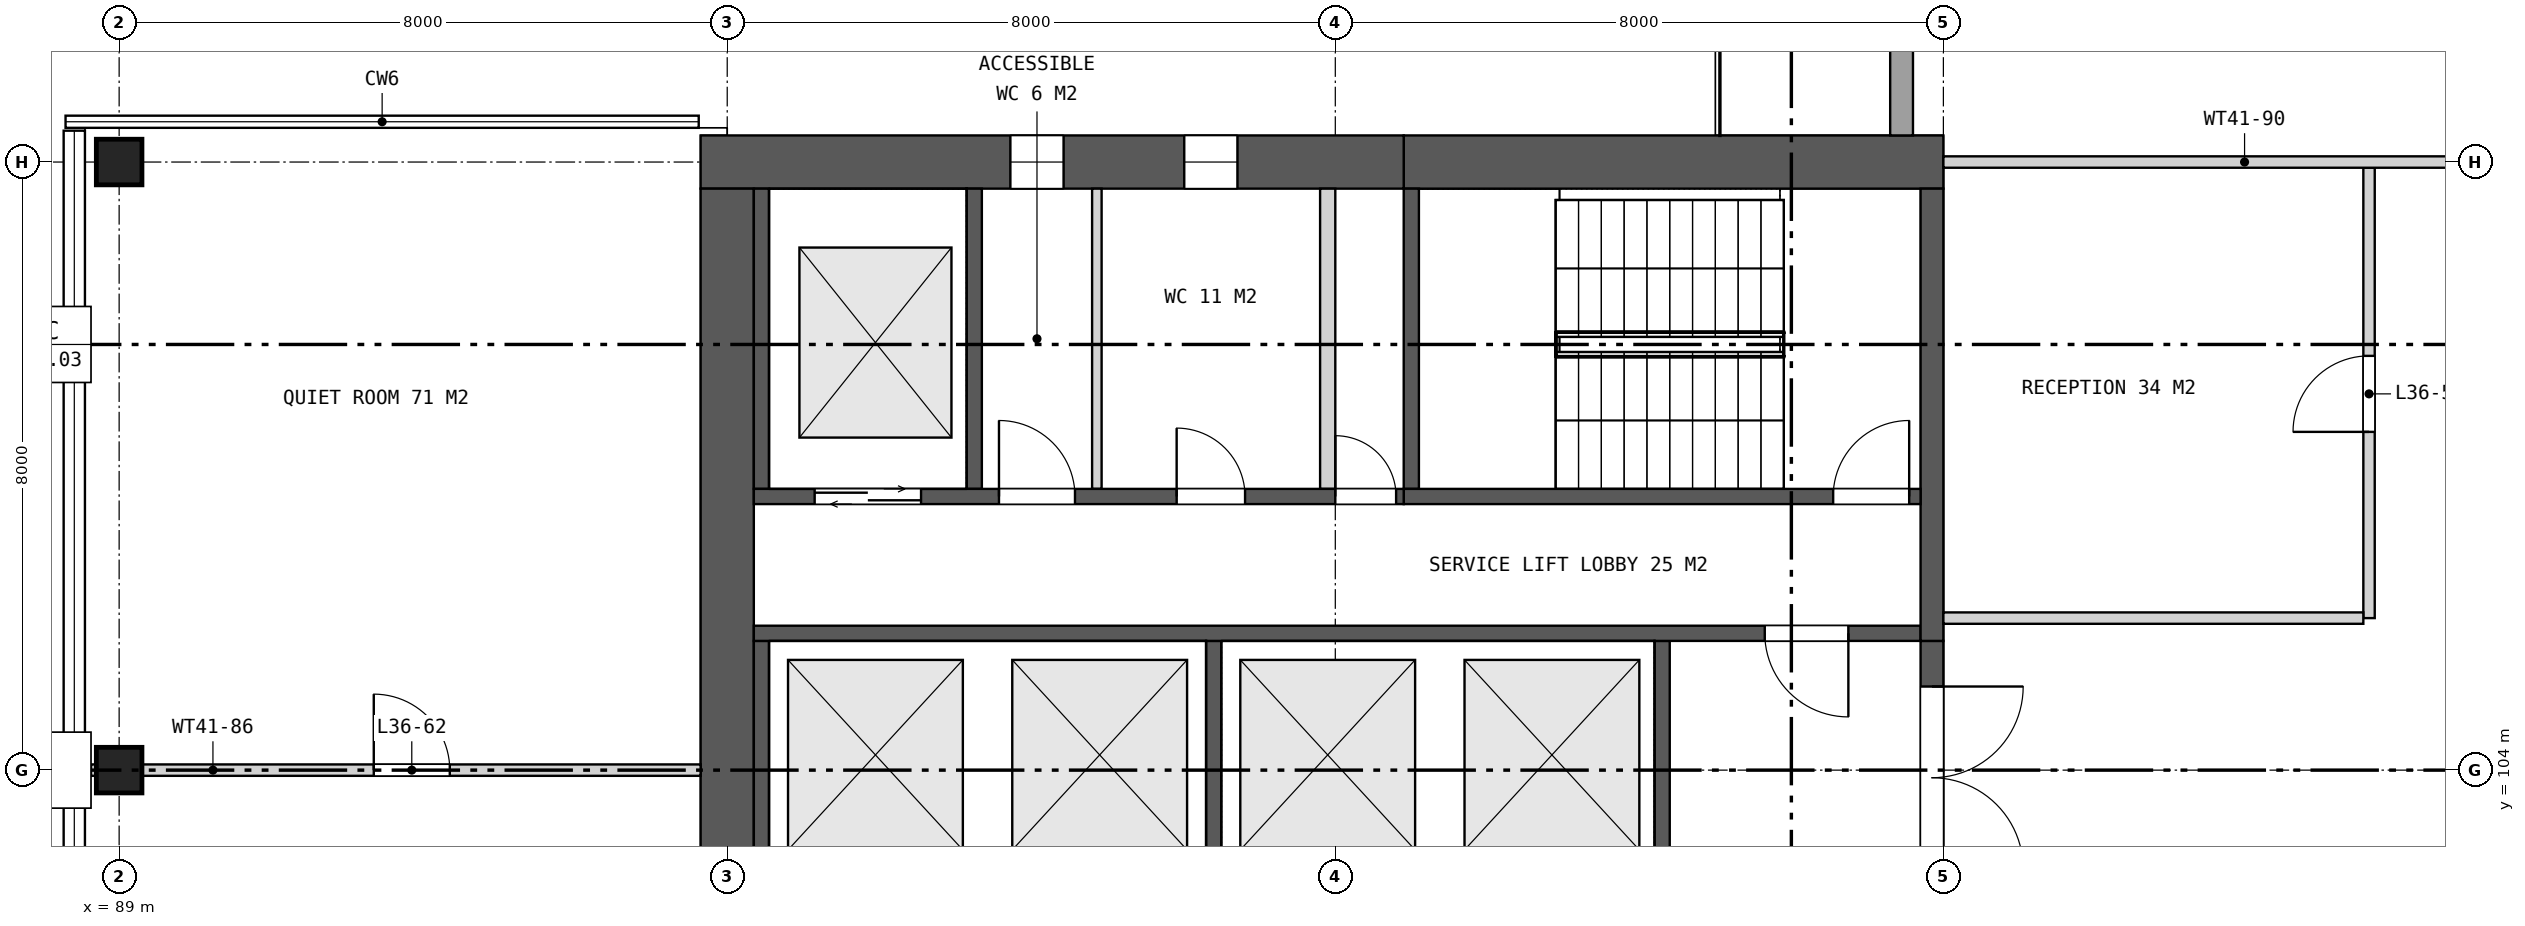
"""IFC4 building model, lengths in metres.
Left out: names, types, materials, properties, quantities, classifications, styles, units other than length and angle.
Written with IfcOpenShell. Run it as: python <this file> out.ifc"""

import sys

from ifc_helpers import new_model, si_unit, direction, frame, frame_2d, origin, origin_2d, place, context, subcontext, project, spatial, rectangle, extrude, element, fill, save


model = new_model("IFC4")
c1 = context("Model", 3, precision=1e-05, world=origin(), true_north=direction((0.0, 1.0)))
c2 = subcontext(c1, "Body", "Model", "MODEL_VIEW")
j1 = project(units=[si_unit("LENGTHUNIT", "METRE"), si_unit("PLANEANGLEUNIT", "RADIAN")], contexts=[c1])
p1 = place(None, origin())
s1 = spatial("IfcSite", under=j1, at=p1, CompositionType="ELEMENT")
p2 = place(p1, origin())
s2 = spatial("IfcBuilding", under=s1, at=p2, CompositionType="ELEMENT")
p3 = place(p2, frame((0.0, 0.0, 171.5)))
s3 = spatial("IfcBuildingStorey", under=s2, at=p3, CompositionType="ELEMENT", Elevation=171.5)
for number, where, z_axis, x_axis in (
    (1, (89.0, 104.0, 0.0), (0.0, 0.0, 1.0), (1.0, 0.0, 0.0)),
    (2, (89.0, 112.0, 0.0), (0.0, 0.0, 1.0), (1.0, 0.0, 0.0)),
):
    element("IfcColumn", number, at=place(p3, frame(where, z_axis=z_axis, x_axis=x_axis)), inside=s3, PredefinedType="COLUMN", context=c2, shape_type="SweptSolid", body=[
        extrude(rectangle(XDim=0.6, YDim=0.6, at=origin_2d()), origin(), (0.0, 0.0, 1.0), 7.4),
    ])
p4 = place(p3, frame((113.0, 112.0, 0.0), z_axis=(0.0, 0.0, 1.0), x_axis=(-1.0, 0.0, 0.0)))
e3 = element("IfcWall", 3, at=p4, inside=s3, PredefinedType="SHEAR", context=c2, shape_type="SweptSolid", body=[
    extrude(rectangle(XDim=7.1, YDim=0.7, at=frame_2d((3.55, 0.0))), origin(), (0.0, 0.0, 1.0), 7.4),
])
p5 = place(p3, frame((105.9, 112.0, 0.0), z_axis=(0.0, 0.0, 1.0), x_axis=(-1.0, 0.0, 0.0)))
e4 = element("IfcWall", 4, at=p5, inside=s3, PredefinedType="SHEAR", context=c2, shape_type="SweptSolid", body=[
    extrude(rectangle(XDim=9.25, YDim=0.7, at=frame_2d((4.625, 0.0))), origin(), (0.0, 0.0, 1.0), 7.4),
])
p6 = place(p5, frame((2.187, 0.0, 1.5)))
e5 = element("IfcOpeningElement", 5, at=p6, cuts=e4, PredefinedType="OPENING", context=c2, shape_type="SweptSolid", body=[
    extrude(rectangle(XDim=0.7, YDim=0.9, at=frame_2d((0.35, 0.45))), frame((0.0, 0.36, 0.0), z_axis=(0.0, -1.0, 0.0), x_axis=(1.0, 0.0, 0.0)), (0.0, 0.0, 1.0), 0.72),
])
p7 = place(p5, frame((4.475, 0.0, 1.5)))
e6 = element("IfcOpeningElement", 6, at=p7, cuts=e4, PredefinedType="OPENING", context=c2, shape_type="SweptSolid", body=[
    extrude(rectangle(XDim=0.7, YDim=0.9, at=frame_2d((0.35, 0.45))), frame((0.0, 0.36, 0.0), z_axis=(0.0, -1.0, 0.0), x_axis=(1.0, 0.0, 0.0)), (0.0, 0.0, 1.0), 0.72),
])
p8 = place(p3, frame((97.0, 111.65, 0.0), z_axis=(0.0, 0.0, 1.0), x_axis=(0.0, -1.0, 0.0)))
e7 = element("IfcWall", 7, at=p8, inside=s3, PredefinedType="SHEAR", context=c2, shape_type="SweptSolid", body=[
    extrude(rectangle(XDim=23.3, YDim=0.7, at=frame_2d((11.65, 0.0))), origin(), (0.0, 0.0, 1.0), 7.4),
])
p9 = place(p8, frame((10.45, 0.0, 0.0)))
e8 = element("IfcOpeningElement", 8, at=p9, cuts=e7, PredefinedType="OPENING", context=c2, shape_type="SweptSolid", body=[
    extrude(rectangle(XDim=2.4, YDim=2.4, at=frame_2d((1.2, 1.2))), frame((0.0, 0.36, 0.0), z_axis=(0.0, -1.0, 0.0), x_axis=(1.0, 0.0, 0.0)), (0.0, 0.0, 1.0), 0.72),
])
p10 = place(p3, frame((112.85, 105.7, 0.0), z_axis=(0.0, 0.0, 1.0), x_axis=(0.0, -1.0, 0.0)))
e9 = element("IfcWall", 9, at=p10, inside=s3, PredefinedType="SHEAR", context=c2, shape_type="SweptSolid", body=[
    extrude(rectangle(XDim=11.4, YDim=0.3, at=frame_2d((5.7, 0.0))), origin(), (0.0, 0.0, 1.0), 7.4),
])
p11 = place(p10, frame((0.6, 0.0, 0.0)))
e10 = element("IfcOpeningElement", 10, at=p11, cuts=e9, PredefinedType="OPENING", context=c2, shape_type="SweptSolid", body=[
    extrude(rectangle(XDim=2.4, YDim=2.4, at=frame_2d((1.2, 1.2))), frame((0.0, 0.16, 0.0), z_axis=(0.0, -1.0, 0.0), x_axis=(1.0, 0.0, 0.0)), (0.0, 0.0, 1.0), 0.32),
])
p12 = place(p10, frame((4.5, 0.0, 0.0)))
e11 = element("IfcOpeningElement", 11, at=p12, cuts=e9, PredefinedType="OPENING", context=c2, shape_type="SweptSolid", body=[
    extrude(rectangle(XDim=2.4, YDim=2.4, at=frame_2d((1.2, 1.2))), frame((0.0, 0.16, 0.0), z_axis=(0.0, -1.0, 0.0), x_axis=(1.0, 0.0, 0.0)), (0.0, 0.0, 1.0), 0.32),
])
p13 = place(p10, frame((8.4, 0.0, 0.0)))
e12 = element("IfcOpeningElement", 12, at=p13, cuts=e9, PredefinedType="OPENING", context=c2, shape_type="SweptSolid", body=[
    extrude(rectangle(XDim=2.4, YDim=2.4, at=frame_2d((1.2, 1.2))), frame((0.0, 0.16, 0.0), z_axis=(0.0, -1.0, 0.0), x_axis=(1.0, 0.0, 0.0)), (0.0, 0.0, 1.0), 0.32),
])
for number, where, z_axis, x_axis in (
    (13, (109.3, 105.7, 0.0), (0.0, 0.0, 1.0), (0.0, -1.0, 0.0)),
    (14, (103.4, 105.7, 0.0), (0.0, 0.0, 1.0), (0.0, -1.0, 0.0)),
    (15, (97.45, 105.7, 0.0), (0.0, 0.0, 1.0), (0.0, -1.0, 0.0)),
):
    element("IfcWall", number, at=place(p3, frame(where, z_axis=z_axis, x_axis=x_axis)), inside=s3, PredefinedType="SHEAR", context=c2, shape_type="SweptSolid", body=[
        extrude(rectangle(XDim=3.0, YDim=0.2, at=frame_2d((1.5, 0.0))), origin(), (0.0, 0.0, 1.0), 7.4),
    ])
p14 = place(p3, frame((112.7, 105.8, 0.0), z_axis=(0.0, 0.0, 1.0), x_axis=(-1.0, 0.0, 0.0)))
e16 = element("IfcWall", 16, at=p14, inside=s3, PredefinedType="SHEAR", context=c2, shape_type="SweptSolid", body=[
    extrude(rectangle(XDim=15.35, YDim=0.2, at=frame_2d((7.675, 0.0))), origin(), (0.0, 0.0, 1.0), 7.4),
])
p15 = place(p14, frame((0.95, 0.0, 0.0)))
e17 = element("IfcOpeningElement", 17, at=p15, cuts=e16, PredefinedType="OPENING", context=c2, shape_type="SweptSolid", body=[
    extrude(rectangle(XDim=1.1, YDim=2.1, at=frame_2d((0.55, 1.05))), frame((0.0, 0.11, 0.0), z_axis=(0.0, -1.0, 0.0), x_axis=(1.0, 0.0, 0.0)), (0.0, 0.0, 1.0), 0.22),
])
p16 = place(p3, frame((112.85, 111.65, 0.0), z_axis=(0.0, 0.0, 1.0), x_axis=(0.0, -1.0, 0.0)))
e18 = element("IfcWall", 18, at=p16, inside=s3, PredefinedType="SHEAR", context=c2, shape_type="SweptSolid", body=[
    extrude(rectangle(XDim=5.95, YDim=0.3, at=frame_2d((2.975, 0.0))), origin(), (0.0, 0.0, 1.0), 7.4),
])
for number, where, z_axis, x_axis in (
    (19, (106.0, 111.65, 0.0), (0.0, 0.0, 1.0), (0.0, -1.0, 0.0)),
    (20, (100.25, 111.65, 0.0), (0.0, 0.0, 1.0), (0.0, -1.0, 0.0)),
    (21, (97.45, 111.65, 0.0), (0.0, 0.0, 1.0), (0.0, -1.0, 0.0)),
):
    element("IfcWall", number, at=place(p3, frame(where, z_axis=z_axis, x_axis=x_axis)), inside=s3, PredefinedType="SHEAR", context=c2, shape_type="SweptSolid", body=[
        extrude(rectangle(XDim=3.95, YDim=0.2, at=frame_2d((1.975, 0.0))), origin(), (0.0, 0.0, 1.0), 7.4),
    ])
p17 = place(p3, frame((104.9, 111.65, 0.0), z_axis=(0.0, 0.0, 1.0), x_axis=(0.0, -1.0, 0.0)))
e22 = element("IfcWall", 22, at=p17, inside=s3, PredefinedType="PARTITIONING", context=c2, shape_type="SweptSolid", body=[
    extrude(rectangle(XDim=3.95, YDim=0.2, at=frame_2d((1.975, 0.0))), origin(), (0.0, 0.0, 1.0), 7.4),
])
p18 = place(p3, frame((101.863, 111.65, 0.0), z_axis=(0.0, 0.0, 1.0), x_axis=(0.0, -1.0, 0.0)))
e23 = element("IfcWall", 23, at=p18, inside=s3, PredefinedType="PARTITIONING", context=c2, shape_type="SweptSolid", body=[
    extrude(rectangle(XDim=3.95, YDim=0.125, at=frame_2d((1.975, 0.0))), origin(), (0.0, 0.0, 1.0), 7.4),
])
p19 = place(p3, frame((112.7, 107.6, 0.0), z_axis=(0.0, 0.0, 1.0), x_axis=(-1.0, 0.0, 0.0)))
e24 = element("IfcWall", 24, at=p19, inside=s3, PredefinedType="SHEAR", context=c2, shape_type="SweptSolid", body=[
    extrude(rectangle(XDim=6.8, YDim=0.2, at=frame_2d((3.4, 0.0))), origin(), (0.0, 0.0, 1.0), 7.4),
])
p20 = place(p19, frame((0.15, 0.0, 0.0)))
e25 = element("IfcOpeningElement", 25, at=p20, cuts=e24, PredefinedType="OPENING", context=c2, shape_type="SweptSolid", body=[
    extrude(rectangle(XDim=1.0, YDim=2.1, at=frame_2d((0.5, 1.05))), frame((0.0, 0.11, 0.0), z_axis=(0.0, -1.0, 0.0), x_axis=(1.0, 0.0, 0.0)), (0.0, 0.0, 1.0), 0.22),
])
p21 = place(p3, frame((105.9, 107.6, 0.0), z_axis=(0.0, 0.0, 1.0), x_axis=(-1.0, 0.0, 0.0)))
e26 = element("IfcWall", 26, at=p21, inside=s3, PredefinedType="SHEAR", context=c2, shape_type="SweptSolid", body=[
    extrude(rectangle(XDim=8.55, YDim=0.2, at=frame_2d((4.275, 0.0))), origin(), (0.0, 0.0, 1.0), 7.4),
])
p22 = place(p21, frame((0.1, 0.0, 0.0)))
e27 = element("IfcOpeningElement", 27, at=p22, cuts=e26, PredefinedType="OPENING", context=c2, shape_type="SweptSolid", body=[
    extrude(rectangle(XDim=0.8, YDim=2.1, at=frame_2d((0.4, 1.05))), frame((0.0, 0.11, 0.0), z_axis=(0.0, -1.0, 0.0), x_axis=(1.0, 0.0, 0.0)), (0.0, 0.0, 1.0), 0.22),
])
p23 = place(p21, frame((2.087, 0.0, 0.0)))
e28 = element("IfcOpeningElement", 28, at=p23, cuts=e26, PredefinedType="OPENING", context=c2, shape_type="SweptSolid", body=[
    extrude(rectangle(XDim=0.9, YDim=2.1, at=frame_2d((0.45, 1.05))), frame((0.0, 0.11, 0.0), z_axis=(0.0, -1.0, 0.0), x_axis=(1.0, 0.0, 0.0)), (0.0, 0.0, 1.0), 0.22),
])
p24 = place(p21, frame((4.325, 0.0, 0.0)))
e29 = element("IfcOpeningElement", 29, at=p24, cuts=e26, PredefinedType="OPENING", context=c2, shape_type="SweptSolid", body=[
    extrude(rectangle(XDim=1.0, YDim=2.1, at=frame_2d((0.5, 1.05))), frame((0.0, 0.11, 0.0), z_axis=(0.0, -1.0, 0.0), x_axis=(1.0, 0.0, 0.0)), (0.0, 0.0, 1.0), 0.22),
])
p25 = place(p21, frame((6.35, 0.0, 0.0)))
e30 = element("IfcOpeningElement", 30, at=p25, cuts=e26, PredefinedType="OPENING", context=c2, shape_type="SweptSolid", body=[
    extrude(rectangle(XDim=1.4, YDim=2.1, at=frame_2d((0.7, 1.05))), frame((0.0, 0.11, 0.0), z_axis=(0.0, -1.0, 0.0), x_axis=(1.0, 0.0, 0.0)), (0.0, 0.0, 1.0), 0.22),
])
p26 = place(p3, frame((112.45, 119.962, 0.0), z_axis=(0.0, 0.0, 1.0), x_axis=(0.0, -1.0, 0.0)))
e31 = element("IfcWall", 31, at=p26, inside=s3, PredefinedType="SOLIDWALL", context=c2, shape_type="SweptSolid", body=[
    extrude(rectangle(XDim=7.612, YDim=0.3, at=frame_2d((3.806, 0.0))), origin(), (0.0, 0.0, 1.0), 7.1),
])
p27 = place(p26, frame((2.762, 0.0, 0.0)))
e32 = element("IfcOpeningElement", 32, at=p27, cuts=e31, PredefinedType="OPENING", context=c2, shape_type="SweptSolid", body=[
    extrude(rectangle(XDim=2.4, YDim=2.4, at=frame_2d((1.2, 1.2))), frame((0.0, 0.16, 0.0), z_axis=(0.0, -1.0, 0.0), x_axis=(1.0, 0.0, 0.0)), (0.0, 0.0, 1.0), 0.32),
])
p28 = place(p3, frame((118.6, 106.0, 0.0), z_axis=(0.0, 0.0, 1.0), x_axis=(0.0, 1.0, 0.0)))
e33 = element("IfcWall", 33, at=p28, inside=s3, PredefinedType="PARTITIONING", context=c2, shape_type="SweptSolid", body=[
    extrude(rectangle(XDim=5.925, YDim=0.15, at=frame_2d((2.962, 0.0))), origin(), (0.0, 0.0, 1.0), 6.64),
])
p29 = place(p28, frame((2.45, 0.0, 0.0)))
e34 = element("IfcOpeningElement", 34, at=p29, cuts=e33, PredefinedType="OPENING", context=c2, shape_type="SweptSolid", body=[
    extrude(rectangle(XDim=1.0, YDim=2.1, at=frame_2d((0.5, 1.05))), frame((0.0, 0.085, 0.0), z_axis=(0.0, -1.0, 0.0), x_axis=(1.0, 0.0, 0.0)), (0.0, 0.0, 1.0), 0.17),
])
p30 = place(p3, frame((88.63, 104.0, 0.0), z_axis=(0.0, 0.0, 1.0), x_axis=(1.0, 0.0, 0.0)))
e35 = element("IfcWall", 35, at=p30, inside=s3, PredefinedType="PARTITIONING", context=c2, shape_type="SweptSolid", body=[
    extrude(rectangle(XDim=8.02, YDim=0.15, at=frame_2d((4.01, 0.0))), origin(), (0.0, 0.0, 1.0), 6.64),
])
p31 = place(p30, frame((3.72, 0.0, 0.0)))
e36 = element("IfcOpeningElement", 36, at=p31, cuts=e35, PredefinedType="OPENING", context=c2, shape_type="SweptSolid", body=[
    extrude(rectangle(XDim=1.0, YDim=2.1, at=frame_2d((0.5, 1.05))), frame((0.0, 0.085, 0.0), z_axis=(0.0, -1.0, 0.0), x_axis=(1.0, 0.0, 0.0)), (0.0, 0.0, 1.0), 0.17),
])
p32 = place(p3, frame((113.0, 106.0, 0.0), z_axis=(0.0, 0.0, 1.0), x_axis=(1.0, 0.0, 0.0)))
e37 = element("IfcWall", 37, at=p32, inside=s3, PredefinedType="PARTITIONING", context=c2, shape_type="SweptSolid", body=[
    extrude(rectangle(XDim=5.525, YDim=0.15, at=frame_2d((2.762, 0.0))), origin(), (0.0, 0.0, 1.0), 6.64),
])
p33 = place(p3, frame((113.0, 112.0, 0.0), z_axis=(0.0, 0.0, 1.0), x_axis=(1.0, 0.0, 0.0)))
e38 = element("IfcWall", 38, at=p33, inside=s3, PredefinedType="PARTITIONING", context=c2, shape_type="SweptSolid", body=[
    extrude(rectangle(XDim=7.925, YDim=0.15, at=frame_2d((3.962, 0.0))), origin(), (0.0, 0.0, 1.0), 6.64),
])
p34 = place(p6, origin())
e39 = element("IfcWindow", 39, at=p34, inside=s3, PartitioningType="SINGLE_PANEL", PredefinedType="WINDOW", context=c2, shape_type="SweptSolid", body=[
    extrude(rectangle(XDim=0.7, YDim=0.9, at=frame_2d((0.35, 0.45))), frame((0.0, 0.03, 0.0), z_axis=(0.0, -1.0, 0.0), x_axis=(1.0, 0.0, 0.0)), (0.0, 0.0, 1.0), 0.06),
])
fill(e5, e39)
p35 = place(p7, origin())
e40 = element("IfcWindow", 40, at=p35, inside=s3, PartitioningType="SINGLE_PANEL", PredefinedType="WINDOW", context=c2, shape_type="SweptSolid", body=[
    extrude(rectangle(XDim=0.7, YDim=0.9, at=frame_2d((0.35, 0.45))), frame((0.0, 0.03, 0.0), z_axis=(0.0, -1.0, 0.0), x_axis=(1.0, 0.0, 0.0)), (0.0, 0.0, 1.0), 0.06),
])
fill(e6, e40)
p36 = place(p11, origin())
e41 = element("IfcDoor", 41, at=p36, inside=s3, OperationType="DOUBLE_DOOR_SINGLE_SWING", PredefinedType="DOOR", context=c2, shape_type="SweptSolid", body=[
    extrude(rectangle(XDim=2.4, YDim=2.4, at=frame_2d((1.2, 1.2))), frame((0.0, 0.025, 0.0), z_axis=(0.0, -1.0, 0.0), x_axis=(1.0, 0.0, 0.0)), (0.0, 0.0, 1.0), 0.05),
])
fill(e10, e41)
p37 = place(p15, origin())
e42 = element("IfcDoor", 42, at=p37, inside=s3, OperationType="SINGLE_SWING_LEFT", PredefinedType="DOOR", context=c2, shape_type="SweptSolid", body=[
    extrude(rectangle(XDim=1.1, YDim=2.1, at=frame_2d((0.55, 1.05))), frame((0.0, 0.025, 0.0), z_axis=(0.0, -1.0, 0.0), x_axis=(1.0, 0.0, 0.0)), (0.0, 0.0, 1.0), 0.05),
])
fill(e17, e42)
p38 = place(p20, frame((1.0, 0.0, 0.0), z_axis=(0.0, 0.0, 1.0), x_axis=(-1.0, 0.0, 0.0)))
e43 = element("IfcDoor", 43, at=p38, inside=s3, OperationType="SINGLE_SWING_RIGHT", PredefinedType="DOOR", context=c2, shape_type="SweptSolid", body=[
    extrude(rectangle(XDim=1.0, YDim=2.1, at=frame_2d((0.5, 1.05))), frame((0.0, 0.025, 0.0), z_axis=(0.0, -1.0, 0.0), x_axis=(1.0, 0.0, 0.0)), (0.0, 0.0, 1.0), 0.05),
])
fill(e25, e43)
p39 = place(p22, frame((0.8, 0.0, 0.0), z_axis=(0.0, 0.0, 1.0), x_axis=(-1.0, 0.0, 0.0)))
e44 = element("IfcDoor", 44, at=p39, inside=s3, OperationType="SINGLE_SWING_LEFT", PredefinedType="DOOR", context=c2, shape_type="SweptSolid", body=[
    extrude(rectangle(XDim=0.8, YDim=2.1, at=frame_2d((0.4, 1.05))), frame((0.0, 0.025, 0.0), z_axis=(0.0, -1.0, 0.0), x_axis=(1.0, 0.0, 0.0)), (0.0, 0.0, 1.0), 0.05),
])
fill(e27, e44)
p40 = place(p23, frame((0.9, 0.0, 0.0), z_axis=(0.0, 0.0, 1.0), x_axis=(-1.0, 0.0, 0.0)))
e45 = element("IfcDoor", 45, at=p40, inside=s3, OperationType="SINGLE_SWING_LEFT", PredefinedType="DOOR", context=c2, shape_type="SweptSolid", body=[
    extrude(rectangle(XDim=0.9, YDim=2.1, at=frame_2d((0.45, 1.05))), frame((0.0, 0.025, 0.0), z_axis=(0.0, -1.0, 0.0), x_axis=(1.0, 0.0, 0.0)), (0.0, 0.0, 1.0), 0.05),
])
fill(e28, e45)
p41 = place(p24, frame((1.0, 0.0, 0.0), z_axis=(0.0, 0.0, 1.0), x_axis=(-1.0, 0.0, 0.0)))
e46 = element("IfcDoor", 46, at=p41, inside=s3, OperationType="SINGLE_SWING_LEFT", PredefinedType="DOOR", context=c2, shape_type="SweptSolid", body=[
    extrude(rectangle(XDim=1.0, YDim=2.1, at=frame_2d((0.5, 1.05))), frame((0.0, 0.025, 0.0), z_axis=(0.0, -1.0, 0.0), x_axis=(1.0, 0.0, 0.0)), (0.0, 0.0, 1.0), 0.05),
])
fill(e29, e46)
p42 = place(p25, origin())
e47 = element("IfcDoor", 47, at=p42, inside=s3, OperationType="DOUBLE_DOOR_SLIDING", PredefinedType="DOOR", context=c2, shape_type="SweptSolid", body=[
    extrude(rectangle(XDim=1.4, YDim=2.1, at=frame_2d((0.7, 1.05))), frame((0.0, 0.025, 0.0), z_axis=(0.0, -1.0, 0.0), x_axis=(1.0, 0.0, 0.0)), (0.0, 0.0, 1.0), 0.05),
])
fill(e30, e47)
p43 = place(p29, origin())
e48 = element("IfcDoor", 48, at=p43, inside=s3, OperationType="SINGLE_SWING_LEFT", PredefinedType="DOOR", context=c2, shape_type="SweptSolid", body=[
    extrude(rectangle(XDim=1.0, YDim=2.1, at=frame_2d((0.5, 1.05))), frame((0.0, 0.025, 0.0), z_axis=(0.0, -1.0, 0.0), x_axis=(1.0, 0.0, 0.0)), (0.0, 0.0, 1.0), 0.05),
])
fill(e34, e48)
p44 = place(p31, origin())
e49 = element("IfcDoor", 49, at=p44, inside=s3, OperationType="SINGLE_SWING_LEFT", PredefinedType="DOOR", context=c2, shape_type="SweptSolid", body=[
    extrude(rectangle(XDim=1.0, YDim=2.1, at=frame_2d((0.5, 1.05))), frame((0.0, 0.025, 0.0), z_axis=(0.0, -1.0, 0.0), x_axis=(1.0, 0.0, 0.0)), (0.0, 0.0, 1.0), 0.05),
])
fill(e36, e49)
save(model, sys.argv[1])
